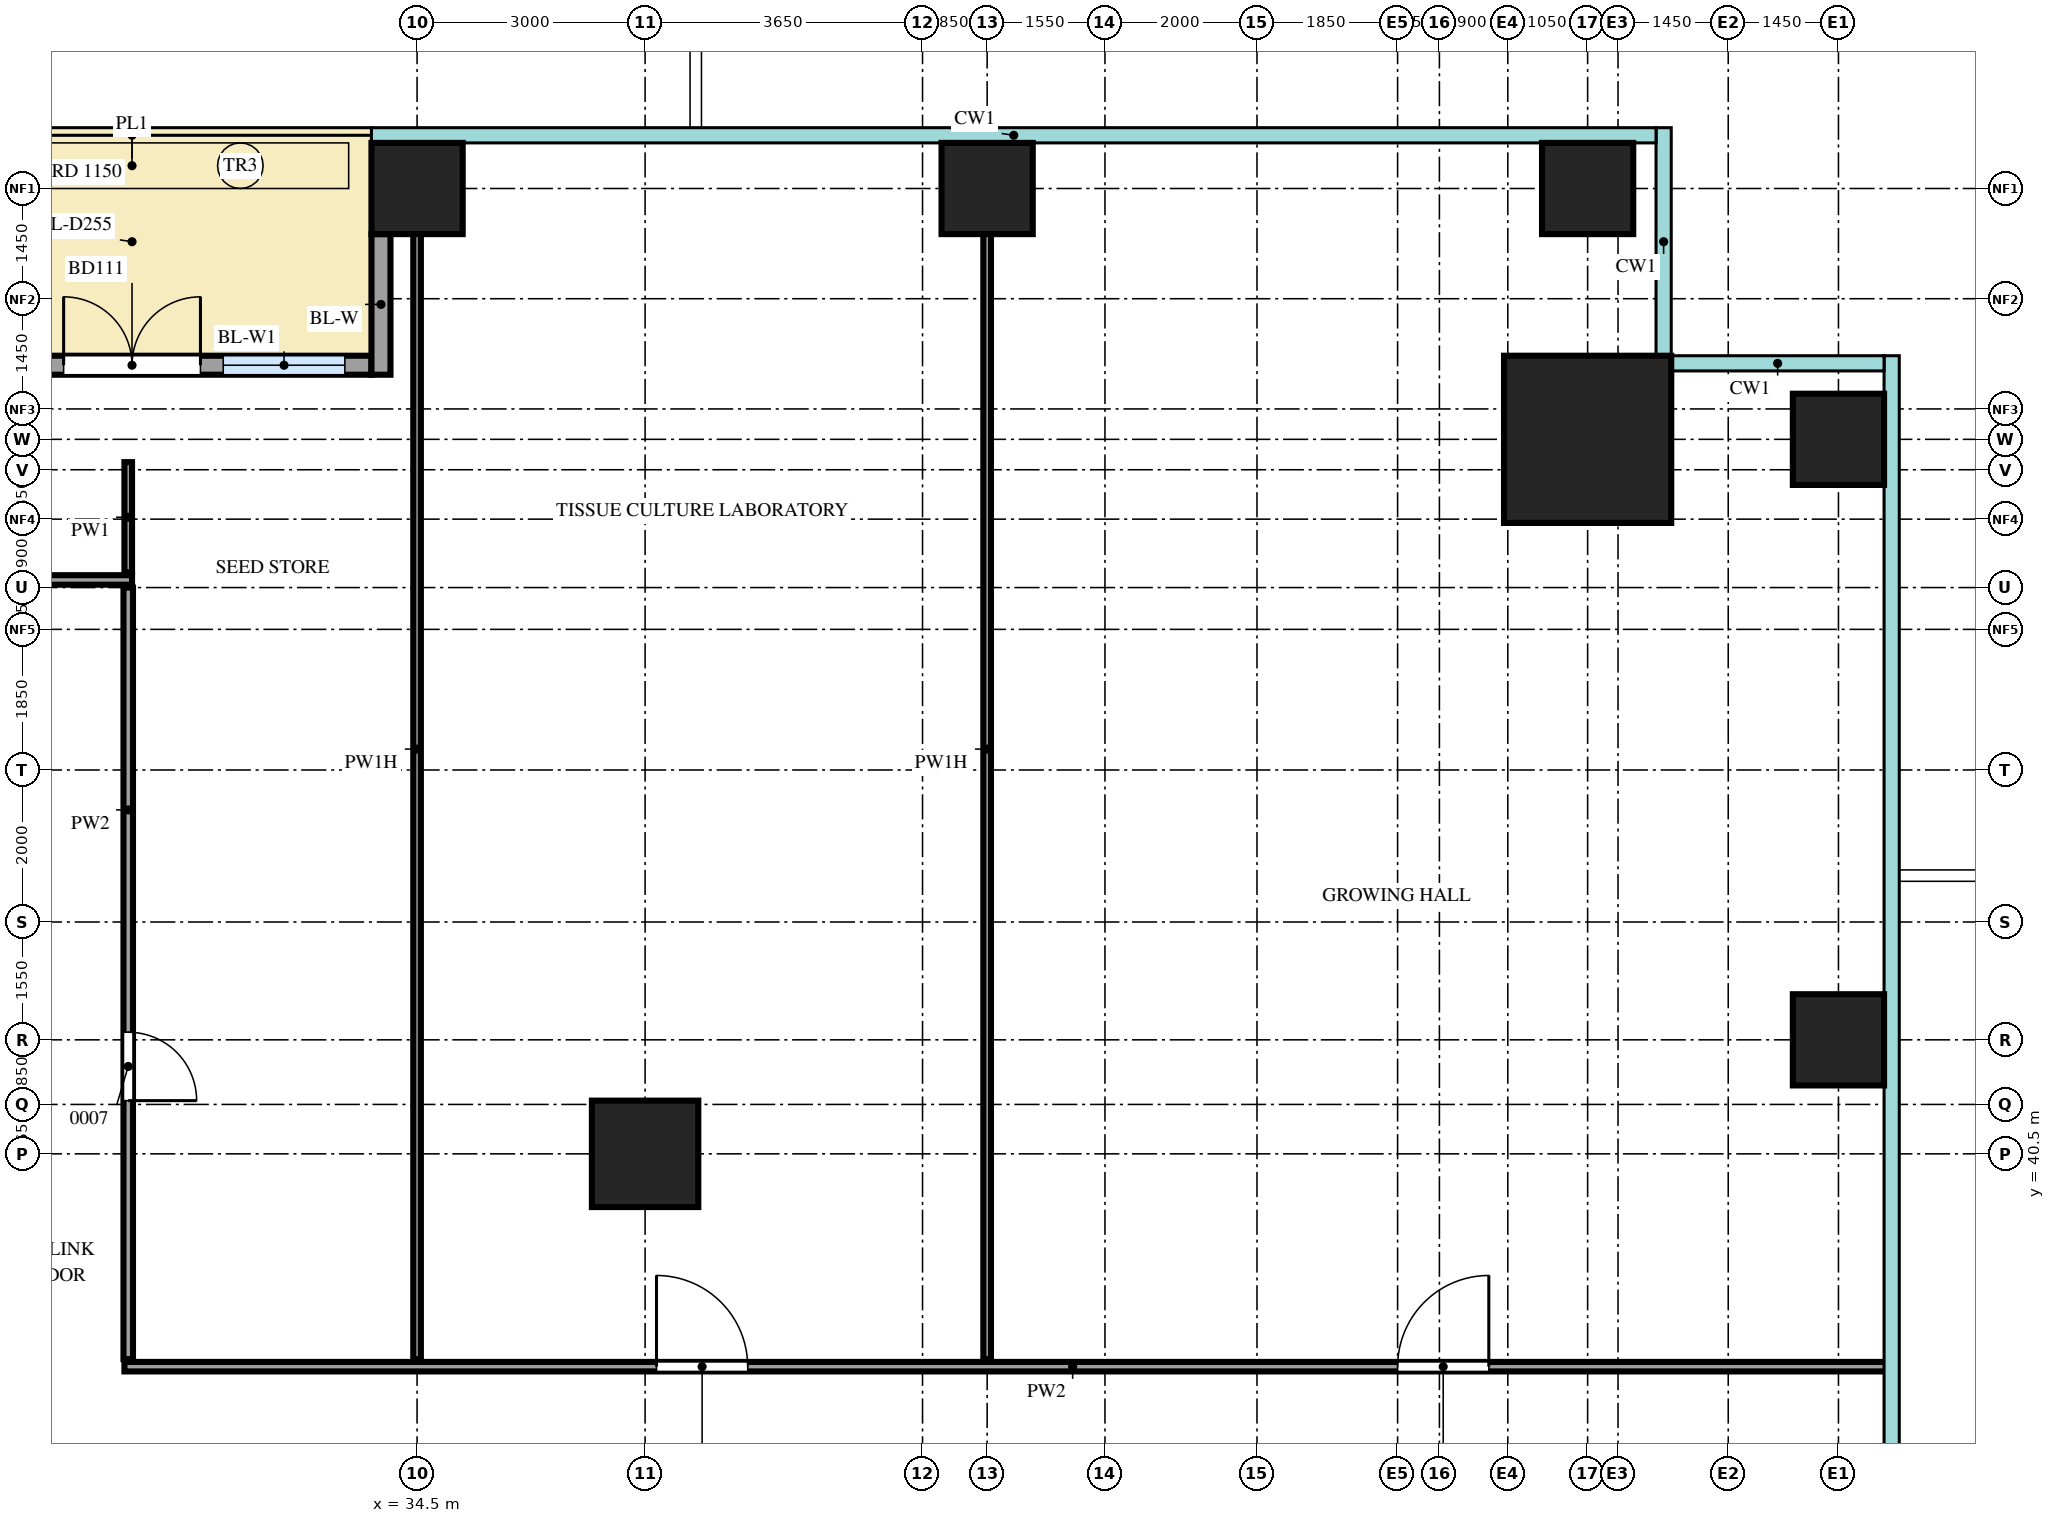
"""IFC4 building model, lengths in metres.
Left out: names, types, materials, properties, quantities, classifications, styles, units other than length and angle.
Written with IfcOpenShell. Run it as: python <this file> out.ifc"""

import sys

from ifc_helpers import new_model, si_unit, direction, frame, frame_2d, origin, origin_2d, place, context, subcontext, project, spatial, rectangle, extrude, source, transform, mapped, element, fill, save


model = new_model("IFC4")
c1 = context("Model", 3, precision=1e-05, world=origin(), true_north=direction((0.0, 1.0)))
c2 = subcontext(c1, "Body", "Model", "MODEL_VIEW")
j1 = project(units=[si_unit("LENGTHUNIT", "METRE"), si_unit("PLANEANGLEUNIT", "RADIAN")], contexts=[c1])
p1 = place(None, origin())
s1 = spatial("IfcSite", under=j1, at=p1, CompositionType="ELEMENT")
p2 = place(p1, origin())
s2 = spatial("IfcBuilding", under=s1, at=p2, CompositionType="ELEMENT")
p3 = place(p2, frame((0.0, 0.0, 55.5)))
s3 = spatial("IfcBuildingStorey", under=s2, at=p3, CompositionType="ELEMENT", Elevation=55.5)
m1 = source(origin(), c2, "Body", "SweptSolid", [
    extrude(rectangle(XDim=2.2, YDim=2.2, at=origin_2d()), origin(), (0.0, 0.0, 1.0), 4.5),
])
p4 = place(p3, frame((49.9, 49.9, 0.0), z_axis=(0.0, 0.0, 1.0), x_axis=(1.0, 0.0, 0.0)))
e1 = element("IfcColumn", 1, at=p4, inside=s3, PredefinedType="COLUMN", context=c2, shape_type="MappedRepresentation", body=[
    mapped(m1, transform((0.0, 0.0, 0.0))),
])
m2 = source(origin(), c2, "Body", "SweptSolid", [
    extrude(rectangle(XDim=1.2, YDim=1.2, at=origin_2d()), origin(), (0.0, 0.0, 1.0), 4.2),
])
for number, where, z_axis, x_axis in (
    (2, (53.2, 42.0, 0.0), (0.0, 0.0, 1.0), (1.0, 0.0, 0.0)),
    (3, (53.2, 49.9, 0.0), (0.0, 0.0, 1.0), (1.0, 0.0, 0.0)),
    (4, (34.5, 53.2, 0.0), (0.0, 0.0, 1.0), (1.0, 0.0, 0.0)),
    (5, (42.0, 53.2, 0.0), (0.0, 0.0, 1.0), (1.0, 0.0, 0.0)),
    (6, (49.9, 53.2, 0.0), (0.0, 0.0, 1.0), (1.0, 0.0, 0.0)),
):
    element("IfcColumn", number, at=place(p3, frame(where, z_axis=z_axis, x_axis=x_axis)), inside=s3, PredefinedType="COLUMN", context=c2, shape_type="MappedRepresentation", body=[
        mapped(m2, transform((0.0, 0.0, 0.0))),
    ])
m3 = source(origin(), c2, "Body", "SweptSolid", [
    extrude(rectangle(XDim=1.4, YDim=1.4, at=origin_2d()), origin(), (0.0, 0.0, 1.0), 4.2),
])
p5 = place(p3, frame((37.5, 40.5, 0.0), z_axis=(0.0, 0.0, 1.0), x_axis=(1.0, 0.0, 0.0)))
e7 = element("IfcColumn", 7, at=p5, inside=s3, PredefinedType="COLUMN", context=c2, shape_type="MappedRepresentation", body=[
    mapped(m3, transform((0.0, 0.0, 0.0))),
])
m4 = source(origin(), c2, "Body", "SweptSolid", [
    extrude(rectangle(XDim=6.3, YDim=0.25, at=frame_2d((3.15, 0.0))), origin(), (0.0, 0.0, 1.0), 4.2),
])
p6 = place(p3, frame((27.6, 50.875, 0.0), z_axis=(0.0, 0.0, 1.0), x_axis=(1.0, 0.0, 0.0)))
e8 = element("IfcWall", 8, at=p6, inside=s3, PredefinedType="SOLIDWALL", context=c2, shape_type="MappedRepresentation", body=[
    mapped(m4, transform((0.0, 0.0, 0.0))),
])
m5 = source(origin(), c2, "Body", "SweptSolid", [
    extrude(rectangle(XDim=1.6, YDim=2.4, at=frame_2d((0.8, 1.2))), frame((0.0, 0.135, 0.0), z_axis=(0.0, -1.0, 0.0), x_axis=(1.0, 0.0, 0.0)), (0.0, 0.0, 1.0), 0.27),
])
p7 = place(p6, frame((0.35, 0.0, 0.0)))
e9 = element("IfcOpeningElement", 9, at=p7, cuts=e8, PredefinedType="OPENING", context=c2, shape_type="MappedRepresentation", body=[
    mapped(m5, transform((0.0, 0.0, 0.0))),
])
p8 = place(p6, frame((4.35, 0.0, 0.0)))
e10 = element("IfcOpeningElement", 10, at=p8, cuts=e8, PredefinedType="OPENING", context=c2, shape_type="MappedRepresentation", body=[
    mapped(m5, transform((0.0, 0.0, 0.0))),
])
m6 = source(origin(), c2, "Body", "SweptSolid", [
    extrude(rectangle(XDim=1.8, YDim=2.4, at=frame_2d((0.9, 1.2))), frame((0.0, 0.135, 0.0), z_axis=(0.0, -1.0, 0.0), x_axis=(1.0, 0.0, 0.0)), (0.0, 0.0, 1.0), 0.27),
])
p9 = place(p6, frame((2.25, 0.0, 0.0)))
e11 = element("IfcOpeningElement", 11, at=p9, cuts=e8, PredefinedType="OPENING", context=c2, shape_type="MappedRepresentation", body=[
    mapped(m6, transform((0.0, 0.0, 0.0))),
])
m7 = source(origin(), c2, "Body", "SweptSolid", [
    extrude(rectangle(XDim=1.85, YDim=0.25, at=frame_2d((0.925, 0.0))), origin(), (0.0, 0.0, 1.0), 4.2),
])
p10 = place(p3, frame((34.025, 52.6, 0.0), z_axis=(0.0, 0.0, 1.0), x_axis=(0.0, -1.0, 0.0)))
e12 = element("IfcWall", 12, at=p10, inside=s3, PredefinedType="SOLIDWALL", context=c2, shape_type="MappedRepresentation", body=[
    mapped(m7, transform((0.0, 0.0, 0.0))),
])
m8 = source(origin(), c2, "Body", "SweptSolid", [
    extrude(rectangle(XDim=23.2, YDim=0.125, at=frame_2d((11.6, 0.0))), origin(), (0.0, 0.0, 1.0), 4.3),
])
p11 = place(p3, frame((30.65, 37.7, 0.0), z_axis=(0.0, 0.0, 1.0), x_axis=(1.0, 0.0, 0.0)))
e13 = element("IfcWall", 13, at=p11, inside=s3, PredefinedType="PARTITIONING", context=c2, shape_type="MappedRepresentation", body=[
    mapped(m8, transform((0.0, 0.0, 0.0))),
])
m9 = source(origin(), c2, "Body", "SweptSolid", [
    extrude(rectangle(XDim=1.2, YDim=2.1, at=frame_2d((0.6, 1.05))), frame((0.0, 0.073, 0.0), z_axis=(0.0, -1.0, 0.0), x_axis=(1.0, 0.0, 0.0)), (0.0, 0.0, 1.0), 0.145),
])
p12 = place(p11, frame((7.0, 0.0, 0.0)))
e14 = element("IfcOpeningElement", 14, at=p12, cuts=e13, PredefinedType="OPENING", context=c2, shape_type="MappedRepresentation", body=[
    mapped(m9, transform((0.0, 0.0, 0.0))),
])
p13 = place(p11, frame((16.75, 0.0, 0.0)))
e15 = element("IfcOpeningElement", 15, at=p13, cuts=e13, PredefinedType="OPENING", context=c2, shape_type="MappedRepresentation", body=[
    mapped(m9, transform((0.0, 0.0, 0.0))),
])
m10 = source(origin(), c2, "Body", "SweptSolid", [
    extrude(rectangle(XDim=10.15, YDim=0.125, at=frame_2d((5.075, 0.0))), origin(), (0.0, 0.0, 1.0), 4.3),
])
p14 = place(p3, frame((30.7, 37.8, 0.0), z_axis=(0.0, 0.0, 1.0), x_axis=(0.0, 1.0, 0.0)))
e16 = element("IfcWall", 16, at=p14, inside=s3, PredefinedType="PARTITIONING", context=c2, shape_type="MappedRepresentation", body=[
    mapped(m10, transform((0.0, 0.0, 0.0))),
])
m11 = source(origin(), c2, "Body", "SweptSolid", [
    extrude(rectangle(XDim=0.9, YDim=2.1, at=frame_2d((0.45, 1.05))), frame((0.0, 0.073, 0.0), z_axis=(0.0, -1.0, 0.0), x_axis=(1.0, 0.0, 0.0)), (0.0, 0.0, 1.0), 0.145),
])
p15 = place(p14, frame((3.4, 0.0, 0.0)))
e17 = element("IfcOpeningElement", 17, at=p15, cuts=e16, PredefinedType="OPENING", context=c2, shape_type="MappedRepresentation", body=[
    mapped(m11, transform((0.0, 0.0, 0.0))),
])
m12 = source(origin(), c2, "Body", "SweptSolid", [
    extrude(rectangle(XDim=16.05, YDim=0.1, at=frame_2d((8.025, 0.0))), origin(), (0.0, 0.0, 1.0), 3.7),
])
for number, where, z_axis, x_axis in (
    (18, (34.5, 37.8, 0.0), (0.0, 0.0, 1.0), (0.0, 1.0, 0.0)),
    (19, (42.0, 37.8, 0.0), (0.0, 0.0, 1.0), (0.0, 1.0, 0.0)),
):
    element("IfcWall", number, at=place(p3, frame(where, z_axis=z_axis, x_axis=x_axis)), inside=s3, PredefinedType="PARTITIONING", context=c2, shape_type="MappedRepresentation", body=[
        mapped(m12, transform((0.0, 0.0, 0.0))),
    ])
m13 = source(origin(), c2, "Body", "SweptSolid", [
    extrude(rectangle(XDim=26.6, YDim=0.125, at=frame_2d((13.3, 0.0))), origin(), (0.0, 0.0, 1.0), 4.3),
])
p16 = place(p3, frame((4.15, 48.05, 0.0), z_axis=(0.0, 0.0, 1.0), x_axis=(1.0, 0.0, 0.0)))
e20 = element("IfcWall", 20, at=p16, inside=s3, PredefinedType="PARTITIONING", context=c2, shape_type="MappedRepresentation", body=[
    mapped(m13, transform((0.0, 0.0, 0.0))),
])
p17 = place(p16, frame((3.5, 0.0, 0.0)))
e21 = element("IfcOpeningElement", 21, at=p17, cuts=e20, PredefinedType="OPENING", context=c2, shape_type="MappedRepresentation", body=[
    mapped(m11, transform((0.0, 0.0, 0.0))),
])
p18 = place(p16, frame((16.6, 0.0, 0.0)))
e22 = element("IfcOpeningElement", 22, at=p18, cuts=e20, PredefinedType="OPENING", context=c2, shape_type="MappedRepresentation", body=[
    mapped(m9, transform((0.0, 0.0, 0.0))),
])
m14 = source(origin(), c2, "Body", "SweptSolid", [
    extrude(rectangle(XDim=1.45, YDim=0.1, at=frame_2d((0.725, 0.0))), origin(), (0.0, 0.0, 1.0), 4.3),
])
p19 = place(p3, frame((30.7, 48.15, 0.0), z_axis=(0.0, 0.0, 1.0), x_axis=(0.0, 1.0, 0.0)))
e23 = element("IfcWall", 23, at=p19, inside=s3, PredefinedType="PARTITIONING", context=c2, shape_type="MappedRepresentation", body=[
    mapped(m14, transform((0.0, 0.0, 0.0))),
])
m15 = source(origin(), c2, "Body", "SweptSolid", [
    extrude(rectangle(XDim=1.6, YDim=2.4, at=frame_2d((0.8, 1.2))), frame((0.0, 0.03, 0.0), z_axis=(0.0, -1.0, 0.0), x_axis=(1.0, 0.0, 0.0)), (0.0, 0.0, 1.0), 0.06),
])
p20 = place(p8, origin())
e24 = element("IfcWindow", 24, at=p20, inside=s3, PartitioningType="SINGLE_PANEL", PredefinedType="WINDOW", context=c2, shape_type="MappedRepresentation", body=[
    mapped(m15, transform((0.0, 0.0, 0.0))),
])
fill(e10, e24)
m16 = source(origin(), c2, "Body", "SweptSolid", [
    extrude(rectangle(XDim=1.8, YDim=2.4, at=frame_2d((0.9, 1.2))), frame((0.0, 0.025, 0.0), z_axis=(0.0, -1.0, 0.0), x_axis=(1.0, 0.0, 0.0)), (0.0, 0.0, 1.0), 0.05),
])
p21 = place(p9, origin())
e25 = element("IfcDoor", 25, at=p21, inside=s3, OperationType="DOUBLE_DOOR_DOUBLE_SWING", PredefinedType="DOOR", context=c2, shape_type="MappedRepresentation", body=[
    mapped(m16, transform((0.0, 0.0, 0.0))),
])
fill(e11, e25)
m17 = source(origin(), c2, "Body", "SweptSolid", [
    extrude(rectangle(XDim=0.9, YDim=2.1, at=frame_2d((0.45, 1.05))), frame((0.0, 0.025, 0.0), z_axis=(0.0, -1.0, 0.0), x_axis=(1.0, 0.0, 0.0)), (0.0, 0.0, 1.0), 0.05),
])
p22 = place(p15, origin())
e26 = element("IfcDoor", 26, at=p22, inside=s3, OperationType="SINGLE_SWING_LEFT", PredefinedType="DOOR", context=c2, shape_type="MappedRepresentation", body=[
    mapped(m17, transform((0.0, 0.0, 0.0))),
])
fill(e17, e26)
m18 = source(origin(), c2, "Body", "SweptSolid", [
    extrude(rectangle(XDim=1.2, YDim=2.1, at=frame_2d((0.6, 1.05))), frame((0.0, 0.025, 0.0), z_axis=(0.0, -1.0, 0.0), x_axis=(1.0, 0.0, 0.0)), (0.0, 0.0, 1.0), 0.05),
])
p23 = place(p12, origin())
e27 = element("IfcDoor", 27, at=p23, inside=s3, OperationType="SINGLE_SWING_RIGHT", PredefinedType="DOOR", context=c2, shape_type="MappedRepresentation", body=[
    mapped(m18, transform((0.0, 0.0, 0.0))),
])
fill(e14, e27)
p24 = place(p13, origin())
e28 = element("IfcDoor", 28, at=p24, inside=s3, OperationType="SINGLE_SWING_LEFT", PredefinedType="DOOR", context=c2, shape_type="MappedRepresentation", body=[
    mapped(m18, transform((0.0, 0.0, 0.0))),
])
fill(e15, e28)
save(model, sys.argv[1])
